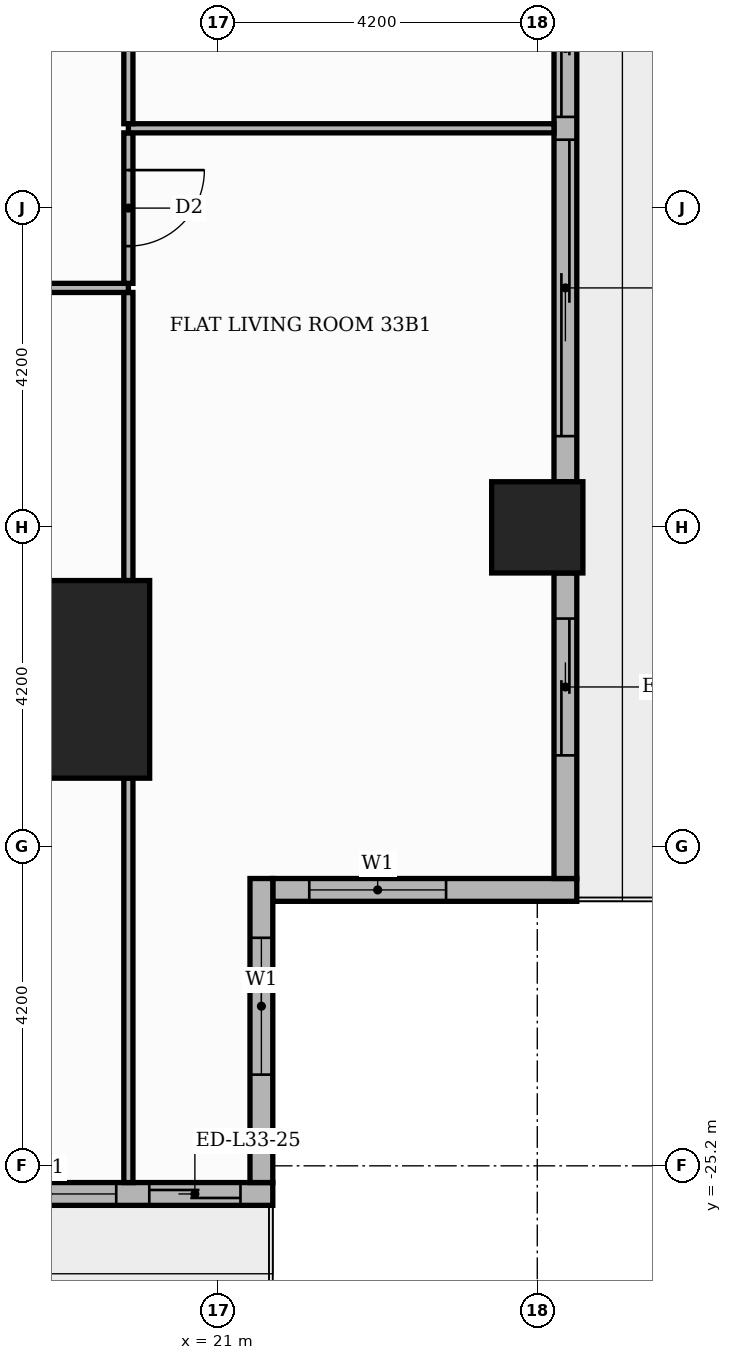
"""IFC4 building model, lengths in metres.
Left out: names, types, materials, properties, quantities, classifications, styles, units other than length and angle.
Written with IfcOpenShell. Run it as: python <this file> out.ifc"""

import sys

from ifc_helpers import new_model, si_unit, direction, frame, frame_2d, origin, origin_2d, place, context, subcontext, project, spatial, rectangle, extrude, element, fill, save


model = new_model("IFC4")
c1 = context("Model", 3, precision=1e-05, world=origin(), true_north=direction((0.0, 1.0)))
c2 = subcontext(c1, "Body", "Model", "MODEL_VIEW")
j1 = project(units=[si_unit("LENGTHUNIT", "METRE"), si_unit("PLANEANGLEUNIT", "RADIAN")], contexts=[c1])
p1 = place(None, origin())
s1 = spatial("IfcSite", under=j1, at=p1, CompositionType="ELEMENT")
p2 = place(p1, origin())
s2 = spatial("IfcBuilding", under=s1, at=p2, CompositionType="ELEMENT")
p3 = place(p2, frame((0.0, 0.0, 141.6)))
s3 = spatial("IfcBuildingStorey", under=s2, at=p3, CompositionType="ELEMENT", Elevation=141.6)
p4 = place(p3, frame((18.8, -18.8, 0.0), z_axis=(0.0, 0.0, 1.0), x_axis=(1.0, 0.0, 0.0)))
e1 = element("IfcColumn", 1, at=p4, inside=s3, PredefinedType="COLUMN", context=c2, shape_type="SweptSolid", body=[
    extrude(rectangle(XDim=2.6, YDim=2.6, at=origin_2d()), origin(), (0.0, 0.0, 1.0), 3.9),
])
p5 = place(p3, frame((25.2, -16.8, 0.0), z_axis=(0.0, 0.0, 1.0), x_axis=(1.0, 0.0, 0.0)))
e2 = element("IfcColumn", 2, at=p5, inside=s3, PredefinedType="COLUMN", context=c2, shape_type="SweptSolid", body=[
    extrude(rectangle(XDim=1.2, YDim=1.2, at=origin_2d()), origin(), (0.0, 0.0, 1.0), 3.9),
])
p6 = place(p3, frame((21.72, -21.57, 0.0), z_axis=(0.0, 0.0, 1.0), x_axis=(1.0, 0.0, 0.0)))
e3 = element("IfcWall", 3, at=p6, inside=s3, PredefinedType="STANDARD", context=c2, shape_type="SweptSolid", body=[
    extrude(rectangle(XDim=4.0, YDim=0.3, at=frame_2d((2.0, 0.0))), origin(), (0.0, 0.0, 1.0), 3.48),
])
p7 = place(p6, frame((0.48, 0.0, 0.9)))
e4 = element("IfcOpeningElement", 4, at=p7, cuts=e3, PredefinedType="OPENING", context=c2, shape_type="SweptSolid", body=[
    extrude(rectangle(XDim=1.8, YDim=2.1, at=frame_2d((0.9, 1.05))), frame((0.0, 0.16, 0.0), z_axis=(0.0, -1.0, 0.0), x_axis=(1.0, 0.0, 0.0)), (0.0, 0.0, 1.0), 0.32),
])
p8 = place(p3, frame((25.57, -21.42, 0.0), z_axis=(0.0, 0.0, 1.0), x_axis=(0.0, 1.0, 0.0)))
e5 = element("IfcWall", 5, at=p8, inside=s3, PredefinedType="STANDARD", context=c2, shape_type="SweptSolid", body=[
    extrude(rectangle(XDim=4.02, YDim=0.3, at=frame_2d((2.01, 0.0))), origin(), (0.0, 0.0, 1.0), 3.48),
])
p9 = place(p8, frame((1.62, 0.0, 0.0)))
e6 = element("IfcOpeningElement", 6, at=p9, cuts=e5, PredefinedType="OPENING", context=c2, shape_type="SweptSolid", body=[
    extrude(rectangle(XDim=1.8, YDim=2.4, at=frame_2d((0.9, 1.2))), frame((0.0, 0.16, 0.0), z_axis=(0.0, -1.0, 0.0), x_axis=(1.0, 0.0, 0.0)), (0.0, 0.0, 1.0), 0.32),
])
p10 = place(p3, frame((25.57, -16.2, 0.0), z_axis=(0.0, 0.0, 1.0), x_axis=(0.0, 1.0, 0.0)))
e7 = element("IfcWall", 7, at=p10, inside=s3, PredefinedType="STANDARD", context=c2, shape_type="SweptSolid", body=[
    extrude(rectangle(XDim=7.2, YDim=0.3, at=frame_2d((3.6, 0.0))), origin(), (0.0, 0.0, 1.0), 3.48),
])
p11 = place(p10, frame((0.6, 0.0, 0.0)))
e8 = element("IfcOpeningElement", 8, at=p11, cuts=e7, PredefinedType="OPENING", context=c2, shape_type="SweptSolid", body=[
    extrude(rectangle(XDim=3.9, YDim=2.4, at=frame_2d((1.95, 1.2))), frame((0.0, 0.16, 0.0), z_axis=(0.0, -1.0, 0.0), x_axis=(1.0, 0.0, 0.0)), (0.0, 0.0, 1.0), 0.32),
])
p12 = place(p10, frame((4.8, 0.0, 0.0)))
e9 = element("IfcOpeningElement", 9, at=p12, cuts=e7, PredefinedType="OPENING", context=c2, shape_type="SweptSolid", body=[
    extrude(rectangle(XDim=1.8, YDim=2.4, at=frame_2d((0.9, 1.2))), frame((0.0, 0.16, 0.0), z_axis=(0.0, -1.0, 0.0), x_axis=(1.0, 0.0, 0.0)), (0.0, 0.0, 1.0), 0.32),
])
p13 = place(p3, frame((17.4, -25.57, 0.0), z_axis=(0.0, 0.0, 1.0), x_axis=(1.0, 0.0, 0.0)))
e10 = element("IfcWall", 10, at=p13, inside=s3, PredefinedType="STANDARD", context=c2, shape_type="SweptSolid", body=[
    extrude(rectangle(XDim=4.32, YDim=0.3, at=frame_2d((2.16, 0.0))), origin(), (0.0, 0.0, 1.0), 3.48),
])
p14 = place(p13, frame((2.695, 0.0, 0.0)))
e11 = element("IfcOpeningElement", 11, at=p14, cuts=e10, PredefinedType="OPENING", context=c2, shape_type="SweptSolid", body=[
    extrude(rectangle(XDim=1.2, YDim=2.4, at=frame_2d((0.6, 1.2))), frame((0.0, 0.16, 0.0), z_axis=(0.0, -1.0, 0.0), x_axis=(1.0, 0.0, 0.0)), (0.0, 0.0, 1.0), 0.32),
])
p15 = place(p13, frame((0.46, 0.0, 0.9)))
e12 = element("IfcOpeningElement", 12, at=p15, cuts=e10, PredefinedType="OPENING", context=c2, shape_type="SweptSolid", body=[
    extrude(rectangle(XDim=1.8, YDim=2.1, at=frame_2d((0.9, 1.05))), frame((0.0, 0.16, 0.0), z_axis=(0.0, -1.0, 0.0), x_axis=(1.0, 0.0, 0.0)), (0.0, 0.0, 1.0), 0.32),
])
p16 = place(p3, frame((21.57, -25.42, 0.0), z_axis=(0.0, 0.0, 1.0), x_axis=(0.0, 1.0, 0.0)))
e13 = element("IfcWall", 13, at=p16, inside=s3, PredefinedType="STANDARD", context=c2, shape_type="SweptSolid", body=[
    extrude(rectangle(XDim=4.0, YDim=0.3, at=frame_2d((2.0, 0.0))), origin(), (0.0, 0.0, 1.0), 3.48),
])
p17 = place(p16, frame((1.42, 0.0, 0.9)))
e14 = element("IfcOpeningElement", 14, at=p17, cuts=e13, PredefinedType="OPENING", context=c2, shape_type="SweptSolid", body=[
    extrude(rectangle(XDim=1.8, YDim=2.1, at=frame_2d((0.9, 1.05))), frame((0.0, 0.16, 0.0), z_axis=(0.0, -1.0, 0.0), x_axis=(1.0, 0.0, 0.0)), (0.0, 0.0, 1.0), 0.32),
])
p18 = place(p3, frame((19.82, -25.42, 0.0), z_axis=(0.0, 0.0, 1.0), x_axis=(0.0, 1.0, 0.0)))
e15 = element("IfcWall", 15, at=p18, inside=s3, PredefinedType="PARTITIONING", context=c2, shape_type="SweptSolid", body=[
    extrude(rectangle(XDim=5.32, YDim=0.12, at=frame_2d((2.66, 0.0))), origin(), (0.0, 0.0, 1.0), 3.48),
])
p19 = place(p3, frame((19.82, -17.5, 0.0), z_axis=(0.0, 0.0, 1.0), x_axis=(0.0, 1.0, 0.0)))
e16 = element("IfcWall", 16, at=p19, inside=s3, PredefinedType="PARTITIONING", context=c2, shape_type="SweptSolid", body=[
    extrude(rectangle(XDim=3.79, YDim=0.12, at=frame_2d((1.895, 0.0))), origin(), (0.0, 0.0, 1.0), 3.48),
])
p20 = place(p3, frame((13.65, -13.65, 0.0), z_axis=(0.0, 0.0, 1.0), x_axis=(1.0, 0.0, 0.0)))
e17 = element("IfcWall", 17, at=p20, inside=s3, PredefinedType="PARTITIONING", context=c2, shape_type="SweptSolid", body=[
    extrude(rectangle(XDim=6.17, YDim=0.12, at=frame_2d((3.085, 0.0))), origin(), (0.0, 0.0, 1.0), 3.48),
])
p21 = place(p20, frame((2.635, 0.0, 0.0)))
e18 = element("IfcOpeningElement", 18, at=p21, cuts=e17, PredefinedType="OPENING", context=c2, shape_type="SweptSolid", body=[
    extrude(rectangle(XDim=0.9, YDim=2.1, at=frame_2d((0.45, 1.05))), frame((0.0, 0.07, 0.0), z_axis=(0.0, -1.0, 0.0), x_axis=(1.0, 0.0, 0.0)), (0.0, 0.0, 1.0), 0.14),
])
p22 = place(p3, frame((19.82, -13.59, 0.0), z_axis=(0.0, 0.0, 1.0), x_axis=(0.0, 1.0, 0.0)))
e19 = element("IfcWall", 19, at=p22, inside=s3, PredefinedType="PARTITIONING", context=c2, shape_type="SweptSolid", body=[
    extrude(rectangle(XDim=1.98, YDim=0.12, at=frame_2d((0.99, 0.0))), origin(), (0.0, 0.0, 1.0), 3.48),
])
p23 = place(p22, frame((0.49, 0.0, 0.0)))
e20 = element("IfcOpeningElement", 20, at=p23, cuts=e19, PredefinedType="OPENING", context=c2, shape_type="SweptSolid", body=[
    extrude(rectangle(XDim=1.0, YDim=2.1, at=frame_2d((0.5, 1.05))), frame((0.0, 0.07, 0.0), z_axis=(0.0, -1.0, 0.0), x_axis=(1.0, 0.0, 0.0)), (0.0, 0.0, 1.0), 0.14),
])
p24 = place(p3, frame((19.82, -11.55, 0.0), z_axis=(0.0, 0.0, 1.0), x_axis=(1.0, 0.0, 0.0)))
e21 = element("IfcWall", 21, at=p24, inside=s3, PredefinedType="PARTITIONING", context=c2, shape_type="SweptSolid", body=[
    extrude(rectangle(XDim=5.6, YDim=0.12, at=frame_2d((2.8, 0.0))), origin(), (0.0, 0.0, 1.0), 3.48),
])
p25 = place(p3, frame((19.82, -11.49, 0.0), z_axis=(0.0, 0.0, 1.0), x_axis=(0.0, 1.0, 0.0)))
e22 = element("IfcWall", 22, at=p25, inside=s3, PredefinedType="PARTITIONING", context=c2, shape_type="SweptSolid", body=[
    extrude(rectangle(XDim=8.28, YDim=0.12, at=frame_2d((4.14, 0.0))), origin(), (0.0, 0.0, 1.0), 3.48),
])
p26 = place(p25, frame((3.64, 0.0, 0.0)))
e23 = element("IfcOpeningElement", 23, at=p26, cuts=e22, PredefinedType="OPENING", context=c2, shape_type="SweptSolid", body=[
    extrude(rectangle(XDim=1.0, YDim=2.1, at=frame_2d((0.5, 1.05))), frame((0.0, 0.07, 0.0), z_axis=(0.0, -1.0, 0.0), x_axis=(1.0, 0.0, 0.0)), (0.0, 0.0, 1.0), 0.14),
])
p27 = place(p7, origin())
e24 = element("IfcWindow", 24, at=p27, inside=s3, PartitioningType="SINGLE_PANEL", PredefinedType="WINDOW", context=c2, shape_type="SweptSolid", body=[
    extrude(rectangle(XDim=1.8, YDim=2.1, at=frame_2d((0.9, 1.05))), frame((0.0, 0.03, 0.0), z_axis=(0.0, -1.0, 0.0), x_axis=(1.0, 0.0, 0.0)), (0.0, 0.0, 1.0), 0.06),
])
fill(e4, e24)
p28 = place(p9, origin())
e25 = element("IfcDoor", 25, at=p28, inside=s3, OperationType="SLIDING_TO_RIGHT", PredefinedType="DOOR", context=c2, shape_type="SweptSolid", body=[
    extrude(rectangle(XDim=1.8, YDim=2.4, at=frame_2d((0.9, 1.2))), frame((0.0, 0.025, 0.0), z_axis=(0.0, -1.0, 0.0), x_axis=(1.0, 0.0, 0.0)), (0.0, 0.0, 1.0), 0.05),
])
fill(e6, e25)
p29 = place(p11, origin())
e26 = element("IfcDoor", 26, at=p29, inside=s3, OperationType="SLIDING_TO_LEFT", PredefinedType="DOOR", context=c2, shape_type="SweptSolid", body=[
    extrude(rectangle(XDim=3.9, YDim=2.4, at=frame_2d((1.95, 1.2))), frame((0.0, 0.025, 0.0), z_axis=(0.0, -1.0, 0.0), x_axis=(1.0, 0.0, 0.0)), (0.0, 0.0, 1.0), 0.05),
])
fill(e8, e26)
p30 = place(p12, origin())
e27 = element("IfcDoor", 27, at=p30, inside=s3, OperationType="SLIDING_TO_RIGHT", PredefinedType="DOOR", context=c2, shape_type="SweptSolid", body=[
    extrude(rectangle(XDim=1.8, YDim=2.4, at=frame_2d((0.9, 1.2))), frame((0.0, 0.025, 0.0), z_axis=(0.0, -1.0, 0.0), x_axis=(1.0, 0.0, 0.0)), (0.0, 0.0, 1.0), 0.05),
])
fill(e9, e27)
p31 = place(p14, origin())
e28 = element("IfcDoor", 28, at=p31, inside=s3, OperationType="SLIDING_TO_LEFT", PredefinedType="DOOR", context=c2, shape_type="SweptSolid", body=[
    extrude(rectangle(XDim=1.2, YDim=2.4, at=frame_2d((0.6, 1.2))), frame((0.0, 0.025, 0.0), z_axis=(0.0, -1.0, 0.0), x_axis=(1.0, 0.0, 0.0)), (0.0, 0.0, 1.0), 0.05),
])
fill(e11, e28)
p32 = place(p15, origin())
e29 = element("IfcWindow", 29, at=p32, inside=s3, PartitioningType="SINGLE_PANEL", PredefinedType="WINDOW", context=c2, shape_type="SweptSolid", body=[
    extrude(rectangle(XDim=1.8, YDim=2.1, at=frame_2d((0.9, 1.05))), frame((0.0, 0.03, 0.0), z_axis=(0.0, -1.0, 0.0), x_axis=(1.0, 0.0, 0.0)), (0.0, 0.0, 1.0), 0.06),
])
fill(e12, e29)
p33 = place(p17, origin())
e30 = element("IfcWindow", 30, at=p33, inside=s3, PartitioningType="SINGLE_PANEL", PredefinedType="WINDOW", context=c2, shape_type="SweptSolid", body=[
    extrude(rectangle(XDim=1.8, YDim=2.1, at=frame_2d((0.9, 1.05))), frame((0.0, 0.03, 0.0), z_axis=(0.0, -1.0, 0.0), x_axis=(1.0, 0.0, 0.0)), (0.0, 0.0, 1.0), 0.06),
])
fill(e14, e30)
p34 = place(p23, frame((1.0, 0.0, 0.0), z_axis=(0.0, 0.0, 1.0), x_axis=(-1.0, 0.0, 0.0)))
e31 = element("IfcDoor", 31, at=p34, inside=s3, OperationType="SINGLE_SWING_RIGHT", PredefinedType="DOOR", context=c2, shape_type="SweptSolid", body=[
    extrude(rectangle(XDim=1.0, YDim=2.1, at=frame_2d((0.5, 1.05))), frame((0.0, 0.025, 0.0), z_axis=(0.0, -1.0, 0.0), x_axis=(1.0, 0.0, 0.0)), (0.0, 0.0, 1.0), 0.05),
])
fill(e20, e31)
save(model, sys.argv[1])
